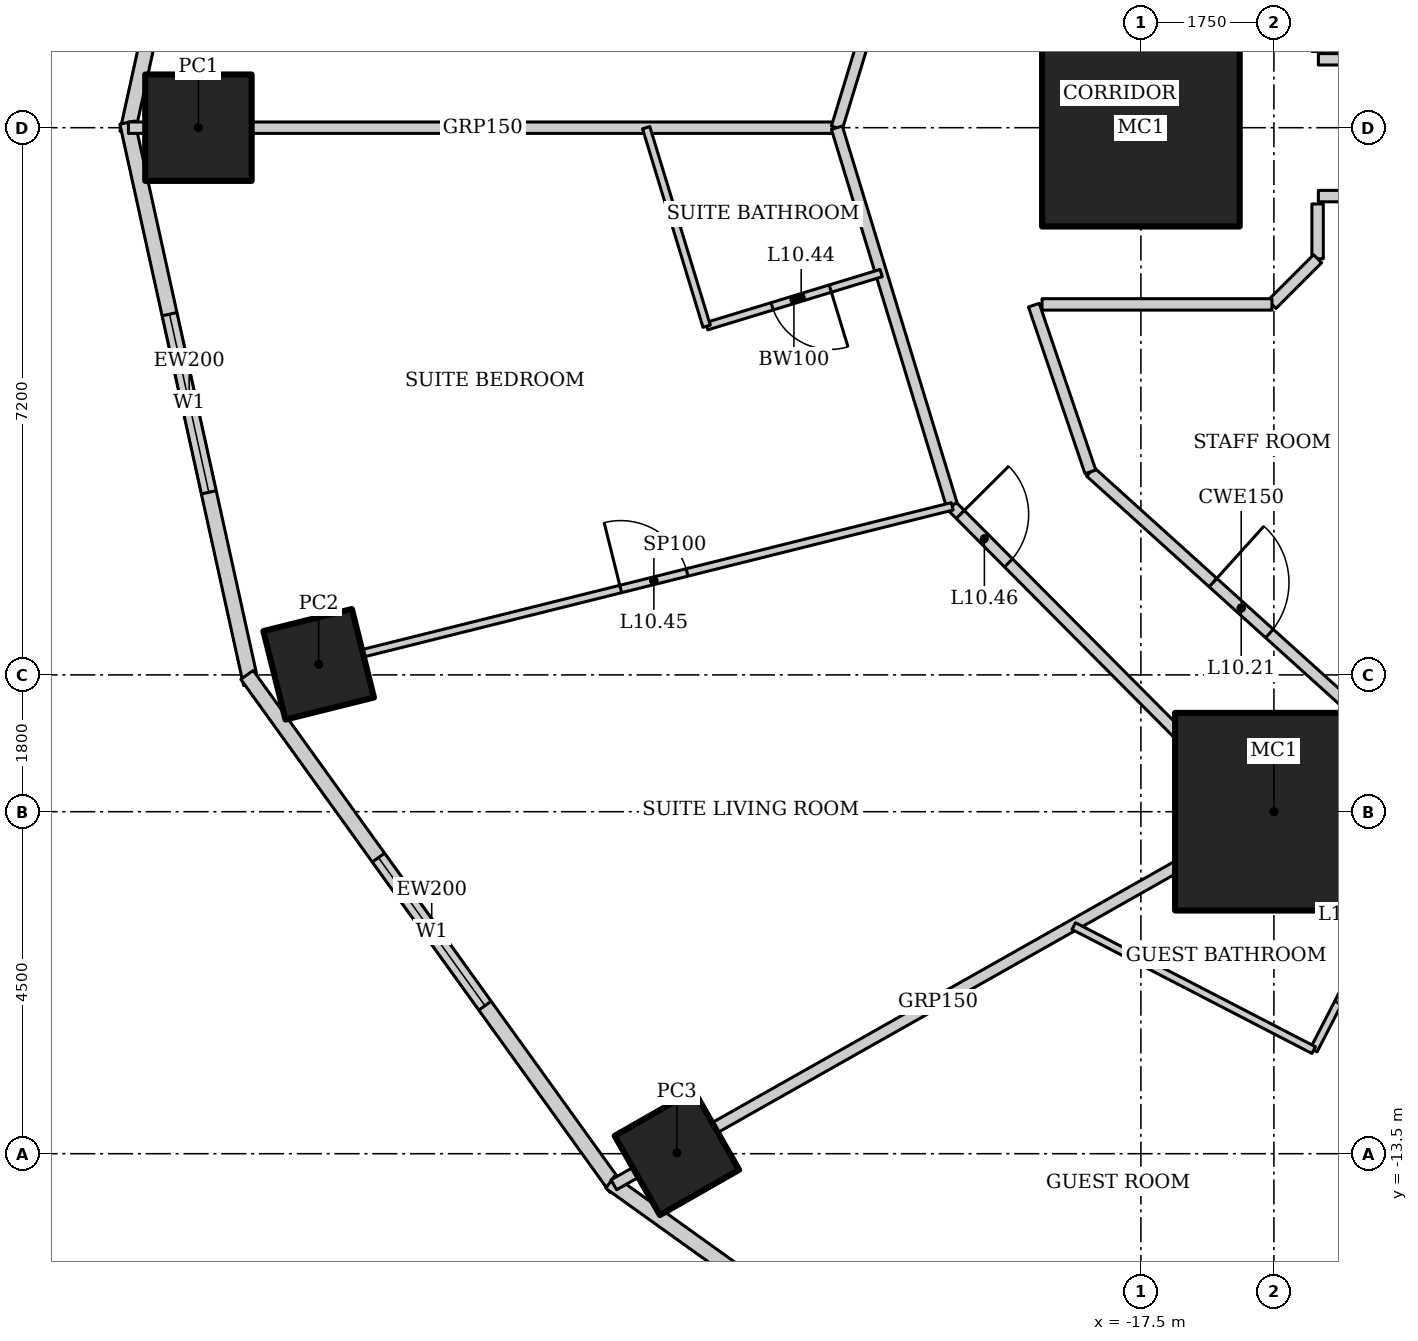
"""IFC4 building model, lengths in metres.
Left out: names, types, materials, properties, quantities, classifications, styles, units other than length and angle.
Written with IfcOpenShell. Run it as: python <this file> out.ifc"""

import sys

from ifc_helpers import new_model, si_unit, direction, frame, frame_2d, origin, origin_2d, place, context, subcontext, project, spatial, rectangle, hollow_rectangle, extrude, element, fill, save


model = new_model("IFC4")
c1 = context("Model", 3, precision=1e-05, world=origin(), true_north=direction((0.0, 1.0)))
c2 = subcontext(c1, "Body", "Model", "MODEL_VIEW")
j1 = project(units=[si_unit("LENGTHUNIT", "METRE"), si_unit("PLANEANGLEUNIT", "RADIAN")], contexts=[c1])
p1 = place(None, origin())
s1 = spatial("IfcSite", under=j1, at=p1, CompositionType="ELEMENT")
p2 = place(p1, origin())
s2 = spatial("IfcBuilding", under=s1, at=p2, CompositionType="ELEMENT")
p3 = place(p2, frame((0.0, 0.0, 51.4)))
s3 = spatial("IfcBuildingStorey", under=s2, at=p3, CompositionType="ELEMENT", Elevation=51.4)
for number, where, z_axis, x_axis in (
    (1, (-17.5, 0.0, 0.0), (0.0, 0.0, 1.0), (1.0, 0.0, 0.0)),
    (2, (-15.75, -9.0, 0.0), (0.0, 0.0, 1.0), (1.0, 0.0, 0.0)),
):
    element("IfcColumn", number, at=place(p3, frame(where, z_axis=z_axis, x_axis=x_axis)), inside=s3, PredefinedType="COLUMN", context=c2, shape_type="SweptSolid", body=[
        extrude(hollow_rectangle(XDim=2.6, YDim=2.6, WallThickness=0.13, at=origin_2d()), origin(), (0.0, 0.0, 1.0), 3.6),
    ])
p4 = place(p3, frame((-29.9, 0.0, 0.0), z_axis=(0.0, 0.0, 1.0), x_axis=(1.0, 0.0, 0.0)))
e3 = element("IfcColumn", 3, at=p4, inside=s3, PredefinedType="COLUMN", context=c2, shape_type="SweptSolid", body=[
    extrude(hollow_rectangle(XDim=1.4, YDim=1.4, WallThickness=0.1, at=origin_2d()), origin(), (0.0, 0.0, 1.0), 3.6),
])
p5 = place(p3, frame((-28.318, -7.06, 0.0), z_axis=(0.0, 0.0, 1.0), x_axis=(0.970295726276, 0.2419218956, 0.0)))
e4 = element("IfcColumn", 4, at=p5, inside=s3, PredefinedType="COLUMN", context=c2, shape_type="SweptSolid", body=[
    extrude(hollow_rectangle(XDim=1.2, YDim=1.2, WallThickness=0.1, at=origin_2d()), origin(), (0.0, 0.0, 1.0), 3.6),
])
p6 = place(p3, frame((-23.605, -13.489, 0.0), z_axis=(0.0, 0.0, 1.0), x_axis=(0.86824298017, 0.496139221777, 0.0)))
e5 = element("IfcColumn", 5, at=p6, inside=s3, PredefinedType="COLUMN", context=c2, shape_type="SweptSolid", body=[
    extrude(hollow_rectangle(XDim=1.2, YDim=1.2, WallThickness=0.12, at=origin_2d()), origin(), (0.0, 0.0, 1.0), 3.6),
])
p7 = place(p3, frame((-29.208, 7.318, 0.0), z_axis=(0.0, 0.0, 1.0), x_axis=(-0.215238065514, -0.976561608478, 0.0)))
e6 = element("IfcWall", 6, at=p7, inside=s3, PredefinedType="SOLIDWALL", context=c2, shape_type="SweptSolid", body=[
    extrude(rectangle(XDim=7.562, YDim=0.2, at=frame_2d((3.781, 0.0))), origin(), (0.0, 0.0, 1.0), 3.45),
])
p8 = place(p7, frame((2.581, 0.0, 0.5)))
e7 = element("IfcOpeningElement", 7, at=p8, cuts=e6, PredefinedType="OPENING", context=c2, shape_type="SweptSolid", body=[
    extrude(rectangle(XDim=2.4, YDim=2.2, at=frame_2d((1.2, 1.1))), frame((0.0, 0.11, 0.0), z_axis=(0.0, -1.0, 0.0), x_axis=(1.0, 0.0, 0.0)), (0.0, 0.0, 1.0), 0.22),
])
p9 = place(p3, frame((-30.835, 0.067, 0.0), z_axis=(0.0, 0.0, 1.0), x_axis=(0.215238065514, -0.976561608478, 0.0)))
e8 = element("IfcWall", 8, at=p9, inside=s3, PredefinedType="SOLIDWALL", context=c2, shape_type="SweptSolid", body=[
    extrude(rectangle(XDim=7.562, YDim=0.2, at=frame_2d((3.781, 0.0))), origin(), (0.0, 0.0, 1.0), 3.45),
])
p10 = place(p9, frame((2.581, 0.0, 0.5)))
e9 = element("IfcOpeningElement", 9, at=p10, cuts=e8, PredefinedType="OPENING", context=c2, shape_type="SweptSolid", body=[
    extrude(rectangle(XDim=2.4, YDim=2.2, at=frame_2d((1.2, 1.1))), frame((0.0, 0.11, 0.0), z_axis=(0.0, -1.0, 0.0), x_axis=(1.0, 0.0, 0.0)), (0.0, 0.0, 1.0), 0.22),
])
p11 = place(p3, frame((-29.26, -7.2, 0.0), z_axis=(0.0, 0.0, 1.0), x_axis=(0.583937613703, -0.811798536155, 0.0)))
e10 = element("IfcWall", 10, at=p11, inside=s3, PredefinedType="SOLIDWALL", context=c2, shape_type="SweptSolid", body=[
    extrude(rectangle(XDim=8.323, YDim=0.2, at=frame_2d((4.162, 0.0))), origin(), (0.0, 0.0, 1.0), 3.45),
])
p12 = place(p11, frame((2.961, 0.0, 0.5)))
e11 = element("IfcOpeningElement", 11, at=p12, cuts=e10, PredefinedType="OPENING", context=c2, shape_type="SweptSolid", body=[
    extrude(rectangle(XDim=2.4, YDim=2.2, at=frame_2d((1.2, 1.1))), frame((0.0, 0.11, 0.0), z_axis=(0.0, -1.0, 0.0), x_axis=(1.0, 0.0, 0.0)), (0.0, 0.0, 1.0), 0.22),
])
p13 = place(p3, frame((-24.482, -13.875, 0.0), z_axis=(0.0, 0.0, 1.0), x_axis=(0.812791321576, -0.582554948112, 0.0)))
e12 = element("IfcWall", 12, at=p13, inside=s3, PredefinedType="SOLIDWALL", context=c2, shape_type="SweptSolid", body=[
    extrude(rectangle(XDim=8.063, YDim=0.2, at=frame_2d((4.032, 0.0))), origin(), (0.0, 0.0, 1.0), 3.45),
])
p14 = place(p13, frame((2.832, 0.0, 0.5)))
e13 = element("IfcOpeningElement", 13, at=p14, cuts=e12, PredefinedType="OPENING", context=c2, shape_type="SweptSolid", body=[
    extrude(rectangle(XDim=2.4, YDim=2.2, at=frame_2d((1.2, 1.1))), frame((0.0, 0.11, 0.0), z_axis=(0.0, -1.0, 0.0), x_axis=(1.0, 0.0, 0.0)), (0.0, 0.0, 1.0), 0.22),
])
p15 = place(p3, frame((-30.821, 0.0, 0.0), z_axis=(0.0, 0.0, 1.0), x_axis=(1.0, 0.0, 0.0)))
e14 = element("IfcWall", 14, at=p15, inside=s3, PredefinedType="PARTITIONING", context=c2, shape_type="SweptSolid", body=[
    extrude(rectangle(XDim=9.321, YDim=0.15, at=frame_2d((4.66, 0.0))), origin(), (0.0, 0.0, 1.0), 2.528),
])
p16 = place(p3, frame((-24.435, -13.909, 0.0), z_axis=(0.0, 0.0, 1.0), x_axis=(0.870612006791, 0.491970256856, 0.0)))
e15 = element("IfcWall", 15, at=p16, inside=s3, PredefinedType="PARTITIONING", context=c2, shape_type="SweptSolid", body=[
    extrude(rectangle(XDim=9.802, YDim=0.15, at=frame_2d((4.901, 0.0))), origin(), (0.0, 0.0, 1.0), 2.693),
])
p17 = place(p3, frame((-17.97, -18.542, 0.0), z_axis=(0.0, 0.0, 1.0), x_axis=(0.698095013805, 0.71600513385, 0.0)))
e16 = element("IfcWall", 16, at=p17, inside=s3, PredefinedType="PARTITIONING", context=c2, shape_type="SweptSolid", body=[
    extrude(rectangle(XDim=9.774, YDim=0.15, at=frame_2d((4.887, 0.0))), origin(), (0.0, 0.0, 1.0), 2.528),
])
p18 = place(p3, frame((-19.982, 4.982, 0.0), z_axis=(0.0, 0.0, 1.0), x_axis=(-0.291383581394, -0.95660629754, 0.0)))
e17 = element("IfcWall", 17, at=p18, inside=s3, PredefinedType="PARTITIONING", context=c2, shape_type="SweptSolid", body=[
    extrude(rectangle(XDim=5.208, YDim=0.15, at=frame_2d((2.604, 0.0))), origin(), (0.0, 0.0, 1.0), 3.45),
])
p19 = place(p18, frame((0.15, 0.0, 0.0)))
e18 = element("IfcOpeningElement", 18, at=p19, cuts=e17, PredefinedType="OPENING", context=c2, shape_type="SweptSolid", body=[
    extrude(rectangle(XDim=0.9, YDim=2.1, at=frame_2d((0.45, 1.05))), frame((0.0, 0.085, 0.0), z_axis=(0.0, -1.0, 0.0), x_axis=(1.0, 0.0, 0.0)), (0.0, 0.0, 1.0), 0.17),
])
p20 = place(p3, frame((-21.5, 0.0, 0.0), z_axis=(0.0, 0.0, 1.0), x_axis=(0.291383581394, -0.95660629754, 0.0)))
e19 = element("IfcWall", 19, at=p20, inside=s3, PredefinedType="PARTITIONING", context=c2, shape_type="SweptSolid", body=[
    extrude(rectangle(XDim=5.208, YDim=0.15, at=frame_2d((2.604, 0.0))), origin(), (0.0, 0.0, 1.0), 3.45),
])
p21 = place(p3, frame((-19.982, -4.982, 0.0), z_axis=(0.0, 0.0, 1.0), x_axis=(0.705121546414, -0.709086457904, 0.0)))
e20 = element("IfcWall", 20, at=p21, inside=s3, PredefinedType="PARTITIONING", context=c2, shape_type="SweptSolid", body=[
    extrude(rectangle(XDim=5.788, YDim=0.15, at=frame_2d((2.894, 0.0))), origin(), (0.0, 0.0, 1.0), 3.45),
])
p22 = place(p21, frame((0.15, 0.0, 0.0)))
e21 = element("IfcOpeningElement", 21, at=p22, cuts=e20, PredefinedType="OPENING", context=c2, shape_type="SweptSolid", body=[
    extrude(rectangle(XDim=0.9, YDim=2.1, at=frame_2d((0.45, 1.05))), frame((0.0, 0.085, 0.0), z_axis=(0.0, -1.0, 0.0), x_axis=(1.0, 0.0, 0.0)), (0.0, 0.0, 1.0), 0.17),
])
p23 = place(p3, frame((-15.901, -9.086, 0.0), z_axis=(0.0, 0.0, 1.0), x_axis=(0.888333171507, -0.459199495209, 0.0)))
e22 = element("IfcWall", 22, at=p23, inside=s3, PredefinedType="PARTITIONING", context=c2, shape_type="SweptSolid", body=[
    extrude(rectangle(XDim=5.351, YDim=0.15, at=frame_2d((2.676, 0.0))), origin(), (0.0, 0.0, 1.0), 3.45),
])
p24 = place(p23, frame((4.301, 0.0, 0.0)))
e23 = element("IfcOpeningElement", 23, at=p24, cuts=e22, PredefinedType="OPENING", context=c2, shape_type="SweptSolid", body=[
    extrude(rectangle(XDim=0.9, YDim=2.1, at=frame_2d((0.45, 1.05))), frame((0.0, 0.085, 0.0), z_axis=(0.0, -1.0, 0.0), x_axis=(1.0, 0.0, 0.0)), (0.0, 0.0, 1.0), 0.17),
])
p25 = place(p3, frame((-18.164, -4.529, 0.0), z_axis=(0.0, 0.0, 1.0), x_axis=(0.742194222, -0.670184852731, 0.0)))
e24 = element("IfcWall", 24, at=p25, inside=s3, PredefinedType="PARTITIONING", context=c2, shape_type="SweptSolid", body=[
    extrude(rectangle(XDim=5.347, YDim=0.15, at=frame_2d((2.673, 0.0))), origin(), (0.0, 0.0, 1.0), 3.45),
])
p26 = place(p25, frame((2.173, 0.0, 0.0)))
e25 = element("IfcOpeningElement", 25, at=p26, cuts=e24, PredefinedType="OPENING", context=c2, shape_type="SweptSolid", body=[
    extrude(rectangle(XDim=1.0, YDim=2.1, at=frame_2d((0.5, 1.05))), frame((0.0, 0.085, 0.0), z_axis=(0.0, -1.0, 0.0), x_axis=(1.0, 0.0, 0.0)), (0.0, 0.0, 1.0), 0.17),
])
p27 = place(p3, frame((-20.917, -1.913, 0.0), z_axis=(0.0, 0.0, 1.0), x_axis=(-0.956591303063, -0.291432803411, 0.0)))
e26 = element("IfcWall", 26, at=p27, inside=s3, PredefinedType="PARTITIONING", context=c2, shape_type="SweptSolid", body=[
    extrude(rectangle(XDim=2.4, YDim=0.1, at=frame_2d((1.2, 0.0))), origin(), (0.0, 0.0, 1.0), 3.45),
])
p28 = place(p27, frame((0.7, 0.0, 0.0)))
e27 = element("IfcOpeningElement", 27, at=p28, cuts=e26, PredefinedType="OPENING", context=c2, shape_type="SweptSolid", body=[
    extrude(rectangle(XDim=0.8, YDim=2.1, at=frame_2d((0.4, 1.05))), frame((0.0, 0.06, 0.0), z_axis=(0.0, -1.0, 0.0), x_axis=(1.0, 0.0, 0.0)), (0.0, 0.0, 1.0), 0.12),
])
p29 = place(p3, frame((-23.213, -2.613, 0.0), z_axis=(0.0, 0.0, 1.0), x_axis=(-0.291339473488, 0.956619731757, 0.0)))
e28 = element("IfcWall", 28, at=p29, inside=s3, PredefinedType="PARTITIONING", context=c2, shape_type="SweptSolid", body=[
    extrude(rectangle(XDim=2.731, YDim=0.1, at=frame_2d((1.365, 0.0))), origin(), (0.0, 0.0, 1.0), 3.45),
])
p30 = place(p3, frame((-27.833, -6.939, 0.0), z_axis=(0.0, 0.0, 1.0), x_axis=(0.97029673161, 0.24191786339, 0.0)))
e29 = element("IfcWall", 29, at=p30, inside=s3, PredefinedType="PARTITIONING", context=c2, shape_type="SweptSolid", body=[
    extrude(rectangle(XDim=8.091, YDim=0.1, at=frame_2d((4.045, 0.0))), origin(), (0.0, 0.0, 1.0), 2.333),
])
p31 = place(p30, frame((3.595, 0.0, 0.0)))
e30 = element("IfcOpeningElement", 30, at=p31, cuts=e29, PredefinedType="OPENING", context=c2, shape_type="SweptSolid", body=[
    extrude(rectangle(XDim=0.9, YDim=2.1, at=frame_2d((0.45, 1.05))), frame((0.0, 0.06, 0.0), z_axis=(0.0, -1.0, 0.0), x_axis=(1.0, 0.0, 0.0)), (0.0, 0.0, 1.0), 0.12),
])
p32 = place(p3, frame((-14.125, -10.005, 0.0), z_axis=(0.0, 0.0, 1.0), x_axis=(-0.459218106657, -0.888323550582, 0.0)))
e31 = element("IfcWall", 31, at=p32, inside=s3, PredefinedType="PARTITIONING", context=c2, shape_type="SweptSolid", body=[
    extrude(rectangle(XDim=2.4, YDim=0.1, at=frame_2d((1.2, 0.0))), origin(), (0.0, 0.0, 1.0), 3.45),
])
p33 = place(p32, frame((0.9, 0.0, 0.0)))
e32 = element("IfcOpeningElement", 32, at=p33, cuts=e31, PredefinedType="OPENING", context=c2, shape_type="SweptSolid", body=[
    extrude(rectangle(XDim=0.8, YDim=2.1, at=frame_2d((0.4, 1.05))), frame((0.0, 0.06, 0.0), z_axis=(0.0, -1.0, 0.0), x_axis=(1.0, 0.0, 0.0)), (0.0, 0.0, 1.0), 0.12),
])
p34 = place(p3, frame((-15.227, -12.137, 0.0), z_axis=(0.0, 0.0, 1.0), x_axis=(-0.888342312029, 0.459181812204, 0.0)))
e33 = element("IfcWall", 33, at=p34, inside=s3, PredefinedType="PARTITIONING", context=c2, shape_type="SweptSolid", body=[
    extrude(rectangle(XDim=3.554, YDim=0.1, at=frame_2d((1.777, 0.0))), origin(), (0.0, 0.0, 1.0), 3.45),
])
p35 = place(p3, frame((-18.908, -2.335, 0.0), z_axis=(0.0, 0.0, 1.0), x_axis=(0.321124194945, -0.947037090837, 0.0)))
e34 = element("IfcWall", 34, at=p35, inside=s3, PredefinedType="PARTITIONING", context=c2, shape_type="SweptSolid", body=[
    extrude(rectangle(XDim=2.317, YDim=0.15, at=frame_2d((1.158, 0.0))), origin(), (0.0, 0.0, 1.0), 3.45),
])
for number, where, z_axis, x_axis in (
    (35, (-14.2, -0.9, 0.0), (0.0, 0.0, 1.0), (-1.0, 0.0, 0.0)),
    (36, (-14.2, 0.9, 0.0), (0.0, 0.0, 1.0), (-1.0, 0.0, 0.0)),
):
    element("IfcWall", number, at=place(p3, frame(where, z_axis=z_axis, x_axis=x_axis)), inside=s3, PredefinedType="PARTITIONING", context=c2, shape_type="SweptSolid", body=[
        extrude(rectangle(XDim=0.965, YDim=0.15, at=frame_2d((0.482, 0.0))), origin(), (0.0, 0.0, 1.0), 3.45),
    ])
p36 = place(p3, frame((-15.175, -1.003, 0.0), z_axis=(0.0, 0.0, 1.0), x_axis=(0.0, -1.0, 0.0)))
e37 = element("IfcWall", 37, at=p36, inside=s3, PredefinedType="PARTITIONING", context=c2, shape_type="SweptSolid", body=[
    extrude(rectangle(XDim=0.721, YDim=0.15, at=frame_2d((0.361, 0.0))), origin(), (0.0, 0.0, 1.0), 3.45),
])
p37 = place(p3, frame((-15.175, -1.725, 0.0), z_axis=(0.0, 0.0, 1.0), x_axis=(-0.707106781187, -0.707106781187, 0.0)))
e38 = element("IfcWall", 38, at=p37, inside=s3, PredefinedType="PARTITIONING", context=c2, shape_type="SweptSolid", body=[
    extrude(rectangle(XDim=0.849, YDim=0.15, at=frame_2d((0.425, 0.0))), origin(), (0.0, 0.0, 1.0), 3.45),
])
p38 = place(p3, frame((-15.775, -2.325, 0.0), z_axis=(0.0, 0.0, 1.0), x_axis=(-1.0, 0.0, 0.0)))
e39 = element("IfcWall", 39, at=p38, inside=s3, PredefinedType="PARTITIONING", context=c2, shape_type="SweptSolid", body=[
    extrude(rectangle(XDim=3.025, YDim=0.15, at=frame_2d((1.513, 0.0))), origin(), (0.0, 0.0, 1.0), 3.45),
])
p39 = place(p10, origin())
e40 = element("IfcWindow", 40, at=p39, inside=s3, PartitioningType="SINGLE_PANEL", PredefinedType="WINDOW", context=c2, shape_type="SweptSolid", body=[
    extrude(rectangle(XDim=2.4, YDim=2.2, at=frame_2d((1.2, 1.1))), frame((0.0, 0.03, 0.0), z_axis=(0.0, -1.0, 0.0), x_axis=(1.0, 0.0, 0.0)), (0.0, 0.0, 1.0), 0.06),
])
fill(e9, e40)
p40 = place(p12, origin())
e41 = element("IfcWindow", 41, at=p40, inside=s3, PartitioningType="SINGLE_PANEL", PredefinedType="WINDOW", context=c2, shape_type="SweptSolid", body=[
    extrude(rectangle(XDim=2.4, YDim=2.2, at=frame_2d((1.2, 1.1))), frame((0.0, 0.03, 0.0), z_axis=(0.0, -1.0, 0.0), x_axis=(1.0, 0.0, 0.0)), (0.0, 0.0, 1.0), 0.06),
])
fill(e11, e41)
p41 = place(p26, origin())
e42 = element("IfcDoor", 42, at=p41, inside=s3, OperationType="SINGLE_SWING_LEFT", PredefinedType="DOOR", context=c2, shape_type="SweptSolid", body=[
    extrude(rectangle(XDim=1.0, YDim=2.1, at=frame_2d((0.5, 1.05))), frame((0.0, 0.025, 0.0), z_axis=(0.0, -1.0, 0.0), x_axis=(1.0, 0.0, 0.0)), (0.0, 0.0, 1.0), 0.05),
])
fill(e25, e42)
p42 = place(p28, origin())
e43 = element("IfcDoor", 43, at=p42, inside=s3, OperationType="SINGLE_SWING_LEFT", PredefinedType="DOOR", context=c2, shape_type="SweptSolid", body=[
    extrude(rectangle(XDim=0.8, YDim=2.1, at=frame_2d((0.4, 1.05))), frame((0.0, 0.025, 0.0), z_axis=(0.0, -1.0, 0.0), x_axis=(1.0, 0.0, 0.0)), (0.0, 0.0, 1.0), 0.05),
])
fill(e27, e43)
p43 = place(p31, origin())
e44 = element("IfcDoor", 44, at=p43, inside=s3, OperationType="SINGLE_SWING_LEFT", PredefinedType="DOOR", context=c2, shape_type="SweptSolid", body=[
    extrude(rectangle(XDim=0.9, YDim=2.1, at=frame_2d((0.45, 1.05))), frame((0.0, 0.025, 0.0), z_axis=(0.0, -1.0, 0.0), x_axis=(1.0, 0.0, 0.0)), (0.0, 0.0, 1.0), 0.05),
])
fill(e30, e44)
p44 = place(p22, origin())
e45 = element("IfcDoor", 45, at=p44, inside=s3, OperationType="SINGLE_SWING_LEFT", PredefinedType="DOOR", context=c2, shape_type="SweptSolid", body=[
    extrude(rectangle(XDim=0.9, YDim=2.1, at=frame_2d((0.45, 1.05))), frame((0.0, 0.025, 0.0), z_axis=(0.0, -1.0, 0.0), x_axis=(1.0, 0.0, 0.0)), (0.0, 0.0, 1.0), 0.05),
])
fill(e21, e45)
p45 = place(p33, origin())
e46 = element("IfcDoor", 46, at=p45, inside=s3, OperationType="SINGLE_SWING_LEFT", PredefinedType="DOOR", context=c2, shape_type="SweptSolid", body=[
    extrude(rectangle(XDim=0.8, YDim=2.1, at=frame_2d((0.4, 1.05))), frame((0.0, 0.025, 0.0), z_axis=(0.0, -1.0, 0.0), x_axis=(1.0, 0.0, 0.0)), (0.0, 0.0, 1.0), 0.05),
])
fill(e32, e46)
save(model, sys.argv[1])
